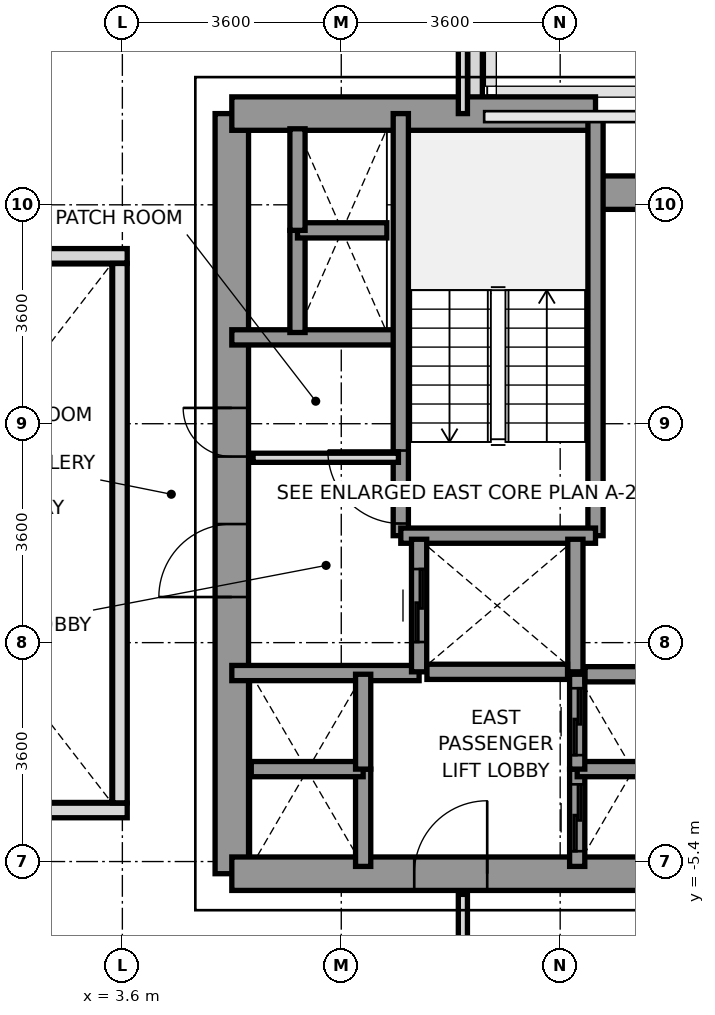
"""IFC4 building model, lengths in metres.
Left out: names, types, materials, properties, quantities, classifications, styles, units other than length and angle.
Written with IfcOpenShell. Run it as: python <this file> out.ifc"""

import sys

from ifc_helpers import new_model, si_unit, direction, frame, frame_2d, origin, place, context, subcontext, project, spatial, rectangle, extrude, source, transform, mapped, element, fill, save


model = new_model("IFC4")
c1 = context("Model", 3, precision=1e-05, world=origin(), true_north=direction((0.0, 1.0)))
c2 = subcontext(c1, "Body", "Model", "MODEL_VIEW")
j1 = project(units=[si_unit("LENGTHUNIT", "METRE"), si_unit("PLANEANGLEUNIT", "RADIAN")], contexts=[c1])
p1 = place(None, origin())
s1 = spatial("IfcSite", under=j1, at=p1, CompositionType="ELEMENT")
p2 = place(p1, origin())
s2 = spatial("IfcBuilding", under=s1, at=p2, CompositionType="ELEMENT")
p3 = place(p2, frame((0.0, 0.0, 78.2)))
s3 = spatial("IfcBuildingStorey", under=s2, at=p3, CompositionType="ELEMENT", Elevation=78.2)
p4 = place(p3, frame((9.4, 8.397, 0.0), z_axis=(0.0, 0.0, 1.0), x_axis=(0.0, -1.0, 0.0)))
e1 = element("IfcWall", 1, at=p4, inside=s3, PredefinedType="PARAPET", context=c2, shape_type="SweptSolid", body=[
    extrude(rectangle(XDim=1.444, YDim=0.24, at=frame_2d((0.722, 0.0))), origin(), (0.0, 0.0, 1.0), 1.15),
])
p5 = place(p3, frame((5.4, -5.6, 0.0), z_axis=(0.0, 0.0, 1.0), x_axis=(0.0, 1.0, 0.0)))
e2 = element("IfcWall", 2, at=p5, inside=s3, PredefinedType="SHEAR", context=c2, shape_type="SweptSolid", body=[
    extrude(rectangle(XDim=12.5, YDim=0.55, at=frame_2d((6.25, 0.0))), origin(), (0.0, 0.0, 1.0), 3.2),
])
p6 = place(p5, frame((4.55, 0.0, 0.0)))
e3 = element("IfcOpeningElement", 3, at=p6, cuts=e2, PredefinedType="OPENING", context=c2, shape_type="SweptSolid", body=[
    extrude(rectangle(XDim=1.2, YDim=2.2, at=frame_2d((0.6, 1.1))), frame((0.0, 0.285, 0.0), z_axis=(0.0, -1.0, 0.0), x_axis=(1.0, 0.0, 0.0)), (0.0, 0.0, 1.0), 0.57),
])
p7 = place(p5, frame((6.86, 0.0, 0.0)))
e4 = element("IfcOpeningElement", 4, at=p7, cuts=e2, PredefinedType="OPENING", context=c2, shape_type="SweptSolid", body=[
    extrude(rectangle(XDim=0.8, YDim=2.1, at=frame_2d((0.4, 1.05))), frame((0.0, 0.285, 0.0), z_axis=(0.0, -1.0, 0.0), x_axis=(1.0, 0.0, 0.0)), (0.0, 0.0, 1.0), 0.57),
])
p8 = place(p3, frame((5.4, 6.9, 0.0), z_axis=(0.0, 0.0, 1.0), x_axis=(1.0, 0.0, 0.0)))
e5 = element("IfcWall", 5, at=p8, inside=s3, PredefinedType="SHEAR", context=c2, shape_type="SweptSolid", body=[
    extrude(rectangle(XDim=5.981, YDim=0.55, at=frame_2d((2.991, 0.0))), origin(), (0.0, 0.0, 1.0), 3.2),
])
p9 = place(p3, frame((11.381, 5.6, 0.0), z_axis=(0.0, 0.0, 1.0), x_axis=(1.0, 0.0, 0.0)))
e6 = element("IfcWall", 6, at=p9, inside=s3, PredefinedType="SHEAR", context=c2, shape_type="SweptSolid", body=[
    extrude(rectangle(XDim=1.819, YDim=0.55, at=frame_2d((0.909, 0.0))), origin(), (0.0, 0.0, 1.0), 3.2),
])
p10 = place(p3, frame((5.4, -5.6, 0.0), z_axis=(0.0, 0.0, 1.0), x_axis=(1.0, 0.0, 0.0)))
e7 = element("IfcWall", 7, at=p10, inside=s3, PredefinedType="SHEAR", context=c2, shape_type="SweptSolid", body=[
    extrude(rectangle(XDim=7.8, YDim=0.55, at=frame_2d((3.9, 0.0))), origin(), (0.0, 0.0, 1.0), 3.2),
])
p11 = place(p10, frame((3.0, 0.0, 0.0)))
e8 = element("IfcOpeningElement", 8, at=p11, cuts=e7, PredefinedType="OPENING", context=c2, shape_type="SweptSolid", body=[
    extrude(rectangle(XDim=1.2, YDim=2.2, at=frame_2d((0.6, 1.1))), frame((0.0, 0.285, 0.0), z_axis=(0.0, -1.0, 0.0), x_axis=(1.0, 0.0, 0.0)), (0.0, 0.0, 1.0), 0.57),
])
p12 = place(p3, frame((5.4, 3.22, 0.0), z_axis=(0.0, 0.0, 1.0), x_axis=(1.0, 0.0, 0.0)))
e9 = element("IfcWall", 9, at=p12, inside=s3, PredefinedType="SOLIDWALL", context=c2, shape_type="SweptSolid", body=[
    extrude(rectangle(XDim=2.78, YDim=0.25, at=frame_2d((1.39, 0.0))), origin(), (0.0, 0.0, 1.0), 3.2),
])
p13 = place(p3, frame((5.4, -2.3, 0.0), z_axis=(0.0, 0.0, 1.0), x_axis=(1.0, 0.0, 0.0)))
e10 = element("IfcWall", 10, at=p13, inside=s3, PredefinedType="SOLIDWALL", context=c2, shape_type="SweptSolid", body=[
    extrude(rectangle(XDim=3.08, YDim=0.25, at=frame_2d((1.54, 0.0))), origin(), (0.0, 0.0, 1.0), 3.2),
])
p14 = place(p3, frame((8.179, -0.041, 0.0), z_axis=(0.0, 0.0, 1.0), x_axis=(0.0, 1.0, 0.0)))
e11 = element("IfcWall", 11, at=p14, inside=s3, PredefinedType="SOLIDWALL", context=c2, shape_type="SweptSolid", body=[
    extrude(rectangle(XDim=6.941, YDim=0.25, at=frame_2d((3.47, 0.0))), origin(), (0.0, 0.0, 1.0), 3.2),
])
p15 = place(p14, frame((0.2, 0.0, 0.0)))
e12 = element("IfcOpeningElement", 12, at=p15, cuts=e11, PredefinedType="OPENING", context=c2, shape_type="SweptSolid", body=[
    extrude(rectangle(XDim=1.2, YDim=2.2, at=frame_2d((0.6, 1.1))), frame((0.0, 0.135, 0.0), z_axis=(0.0, -1.0, 0.0), x_axis=(1.0, 0.0, 0.0)), (0.0, 0.0, 1.0), 0.27),
])
p16 = place(p3, frame((11.381, -0.041, 0.0), z_axis=(0.0, 0.0, 1.0), x_axis=(0.0, 1.0, 0.0)))
e13 = element("IfcWall", 13, at=p16, inside=s3, PredefinedType="SOLIDWALL", context=c2, shape_type="SweptSolid", body=[
    extrude(rectangle(XDim=6.941, YDim=0.25, at=frame_2d((3.47, 0.0))), origin(), (0.0, 0.0, 1.0), 3.2),
])
p17 = place(p3, frame((8.179, -0.041, 0.0), z_axis=(0.0, 0.0, 1.0), x_axis=(1.0, 0.0, 0.0)))
e14 = element("IfcWall", 14, at=p17, inside=s3, PredefinedType="SOLIDWALL", context=c2, shape_type="SweptSolid", body=[
    extrude(rectangle(XDim=3.202, YDim=0.25, at=frame_2d((1.601, 0.0))), origin(), (0.0, 0.0, 1.0), 3.2),
])
p18 = place(p3, frame((8.48, -2.28, 0.0), z_axis=(0.0, 0.0, 1.0), x_axis=(0.0, 1.0, 0.0)))
e15 = element("IfcWall", 15, at=p18, inside=s3, PredefinedType="SOLIDWALL", context=c2, shape_type="SweptSolid", body=[
    extrude(rectangle(XDim=2.18, YDim=0.25, at=frame_2d((1.09, 0.0))), origin(), (0.0, 0.0, 1.0), 3.2),
])
p19 = place(p18, frame((0.49, 0.0, 0.0)))
e16 = element("IfcOpeningElement", 16, at=p19, cuts=e15, PredefinedType="OPENING", context=c2, shape_type="SweptSolid", body=[
    extrude(rectangle(XDim=1.2, YDim=2.2, at=frame_2d((0.6, 1.1))), frame((0.0, 0.135, 0.0), z_axis=(0.0, -1.0, 0.0), x_axis=(1.0, 0.0, 0.0)), (0.0, 0.0, 1.0), 0.27),
])
p20 = place(p3, frame((11.05, -2.28, 0.0), z_axis=(0.0, 0.0, 1.0), x_axis=(0.0, 1.0, 0.0)))
e17 = element("IfcWall", 17, at=p20, inside=s3, PredefinedType="SOLIDWALL", context=c2, shape_type="SweptSolid", body=[
    extrude(rectangle(XDim=2.18, YDim=0.25, at=frame_2d((1.09, 0.0))), origin(), (0.0, 0.0, 1.0), 3.2),
])
p21 = place(p3, frame((8.609, -2.28, 0.0), z_axis=(0.0, 0.0, 1.0), x_axis=(1.0, 0.0, 0.0)))
e18 = element("IfcWall", 18, at=p21, inside=s3, PredefinedType="SOLIDWALL", context=c2, shape_type="SweptSolid", body=[
    extrude(rectangle(XDim=2.312, YDim=0.25, at=frame_2d((1.156, 0.0))), origin(), (0.0, 0.0, 1.0), 3.2),
])
p22 = place(p3, frame((11.08, -5.48, 0.0), z_axis=(0.0, 0.0, 1.0), x_axis=(0.0, 1.0, 0.0)))
e19 = element("IfcWall", 19, at=p22, inside=s3, PredefinedType="SOLIDWALL", context=c2, shape_type="SweptSolid", body=[
    extrude(rectangle(XDim=1.6, YDim=0.25, at=frame_2d((0.8, 0.0))), origin(), (0.0, 0.0, 1.0), 3.2),
])
p23 = place(p22, frame((0.25, 0.0, 0.0)))
e20 = element("IfcOpeningElement", 20, at=p23, cuts=e19, PredefinedType="OPENING", context=c2, shape_type="SweptSolid", body=[
    extrude(rectangle(XDim=1.1, YDim=2.2, at=frame_2d((0.55, 1.1))), frame((0.0, 0.135, 0.0), z_axis=(0.0, -1.0, 0.0), x_axis=(1.0, 0.0, 0.0)), (0.0, 0.0, 1.0), 0.27),
])
p24 = place(p3, frame((11.08, -3.88, 0.0), z_axis=(0.0, 0.0, 1.0), x_axis=(1.0, 0.0, 0.0)))
e21 = element("IfcWall", 21, at=p24, inside=s3, PredefinedType="SOLIDWALL", context=c2, shape_type="SweptSolid", body=[
    extrude(rectangle(XDim=1.84, YDim=0.25, at=frame_2d((0.92, 0.0))), origin(), (0.0, 0.0, 1.0), 3.2),
])
p25 = place(p3, frame((11.08, -3.88, 0.0), z_axis=(0.0, 0.0, 1.0), x_axis=(0.0, 1.0, 0.0)))
e22 = element("IfcWall", 22, at=p25, inside=s3, PredefinedType="SOLIDWALL", context=c2, shape_type="SweptSolid", body=[
    extrude(rectangle(XDim=1.56, YDim=0.25, at=frame_2d((0.78, 0.0))), origin(), (0.0, 0.0, 1.0), 3.2),
])
p26 = place(p25, frame((0.23, 0.0, 0.0)))
e23 = element("IfcOpeningElement", 23, at=p26, cuts=e22, PredefinedType="OPENING", context=c2, shape_type="SweptSolid", body=[
    extrude(rectangle(XDim=1.1, YDim=2.2, at=frame_2d((0.55, 1.1))), frame((0.0, 0.135, 0.0), z_axis=(0.0, -1.0, 0.0), x_axis=(1.0, 0.0, 0.0)), (0.0, 0.0, 1.0), 0.27),
])
p27 = place(p3, frame((11.209, -2.32, 0.0), z_axis=(0.0, 0.0, 1.0), x_axis=(1.0, 0.0, 0.0)))
e24 = element("IfcWall", 24, at=p27, inside=s3, PredefinedType="SOLIDWALL", context=c2, shape_type="SweptSolid", body=[
    extrude(rectangle(XDim=1.582, YDim=0.25, at=frame_2d((0.791, 0.0))), origin(), (0.0, 0.0, 1.0), 3.2),
])
p28 = place(p3, frame((7.56, -5.48, 0.0), z_axis=(0.0, 0.0, 1.0), x_axis=(0.0, 1.0, 0.0)))
e25 = element("IfcWall", 25, at=p28, inside=s3, PredefinedType="SOLIDWALL", context=c2, shape_type="SweptSolid", body=[
    extrude(rectangle(XDim=1.6, YDim=0.25, at=frame_2d((0.8, 0.0))), origin(), (0.0, 0.0, 1.0), 3.2),
])
p29 = place(p3, frame((5.72, -3.88, 0.0), z_axis=(0.0, 0.0, 1.0), x_axis=(1.0, 0.0, 0.0)))
e26 = element("IfcWall", 26, at=p29, inside=s3, PredefinedType="SOLIDWALL", context=c2, shape_type="SweptSolid", body=[
    extrude(rectangle(XDim=1.84, YDim=0.25, at=frame_2d((0.92, 0.0))), origin(), (0.0, 0.0, 1.0), 3.2),
])
p30 = place(p3, frame((7.56, -3.88, 0.0), z_axis=(0.0, 0.0, 1.0), x_axis=(0.0, 1.0, 0.0)))
e27 = element("IfcWall", 27, at=p30, inside=s3, PredefinedType="SOLIDWALL", context=c2, shape_type="SweptSolid", body=[
    extrude(rectangle(XDim=1.56, YDim=0.25, at=frame_2d((0.78, 0.0))), origin(), (0.0, 0.0, 1.0), 3.2),
])
p31 = place(p3, frame((6.48, 3.3, 0.0), z_axis=(0.0, 0.0, 1.0), x_axis=(0.0, 1.0, 0.0)))
e28 = element("IfcWall", 28, at=p31, inside=s3, PredefinedType="SOLIDWALL", context=c2, shape_type="SweptSolid", body=[
    extrude(rectangle(XDim=1.68, YDim=0.25, at=frame_2d((0.84, 0.0))), origin(), (0.0, 0.0, 1.0), 3.2),
])
p32 = place(p3, frame((6.48, 4.98, 0.0), z_axis=(0.0, 0.0, 1.0), x_axis=(1.0, 0.0, 0.0)))
e29 = element("IfcWall", 29, at=p32, inside=s3, PredefinedType="SOLIDWALL", context=c2, shape_type="SweptSolid", body=[
    extrude(rectangle(XDim=1.47, YDim=0.25, at=frame_2d((0.735, 0.0))), origin(), (0.0, 0.0, 1.0), 3.2),
])
p33 = place(p3, frame((6.48, 4.98, 0.0), z_axis=(0.0, 0.0, 1.0), x_axis=(0.0, 1.0, 0.0)))
e30 = element("IfcWall", 30, at=p33, inside=s3, PredefinedType="SOLIDWALL", context=c2, shape_type="SweptSolid", body=[
    extrude(rectangle(XDim=1.67, YDim=0.25, at=frame_2d((0.835, 0.0))), origin(), (0.0, 0.0, 1.0), 3.2),
])
p34 = place(p3, frame((5.75, 1.24, 0.0), z_axis=(0.0, 0.0, 1.0), x_axis=(1.0, 0.0, 0.0)))
e31 = element("IfcWall", 31, at=p34, inside=s3, PredefinedType="PARTITIONING", context=c2, shape_type="SweptSolid", body=[
    extrude(rectangle(XDim=2.39, YDim=0.15, at=frame_2d((1.195, 0.0))), origin(), (0.0, 0.0, 1.0), 2.3),
])
p35 = place(p3, frame((9.2, 6.9, 0.0), z_axis=(0.0, 0.0, 1.0), x_axis=(0.0, 1.0, 0.0)))
e32 = element("IfcWall", 32, at=p35, inside=s3, PredefinedType="PARTITIONING", context=c2, shape_type="SweptSolid", body=[
    extrude(rectangle(XDim=8.78, YDim=0.15, at=frame_2d((4.39, 0.0))), origin(), (0.0, 0.0, 1.0), 2.65),
])
p36 = place(p3, frame((9.2, -15.68, 0.0), z_axis=(0.0, 0.0, 1.0), x_axis=(0.0, 1.0, 0.0)))
e33 = element("IfcWall", 33, at=p36, inside=s3, PredefinedType="PARTITIONING", context=c2, shape_type="SweptSolid", body=[
    extrude(rectangle(XDim=9.74, YDim=0.15, at=frame_2d((4.87, 0.0))), origin(), (0.0, 0.0, 1.0), 2.65),
])
for number, where, z_axis, x_axis in (
    (34, (-3.68, -4.56, 0.0), (0.0, 0.0, 1.0), (1.0, 0.0, 0.0)),
    (35, (-3.68, 4.56, 0.0), (0.0, 0.0, 1.0), (1.0, 0.0, 0.0)),
):
    element("IfcWall", number, at=place(p3, frame(where, z_axis=z_axis, x_axis=x_axis)), inside=s3, PredefinedType="PARAPET", context=c2, shape_type="SweptSolid", body=[
        extrude(rectangle(XDim=7.36, YDim=0.24, at=frame_2d((3.68, 0.0))), origin(), (0.0, 0.0, 1.0), 1.15),
    ])
p37 = place(p3, frame((3.56, -4.435, 0.0), z_axis=(0.0, 0.0, 1.0), x_axis=(0.0, 1.0, 0.0)))
e36 = element("IfcWall", 36, at=p37, inside=s3, PredefinedType="PARAPET", context=c2, shape_type="SweptSolid", body=[
    extrude(rectangle(XDim=8.87, YDim=0.24, at=frame_2d((4.435, 0.0))), origin(), (0.0, 0.0, 1.0), 1.15),
])
m1 = source(origin(), c2, "Body", "SweptSolid", [
    extrude(rectangle(XDim=1.2, YDim=2.2, at=frame_2d((0.6, 1.1))), frame((0.0, 0.025, 0.0), z_axis=(0.0, -1.0, 0.0), x_axis=(1.0, 0.0, 0.0)), (0.0, 0.0, 1.0), 0.05),
])
p38 = place(p15, origin())
e37 = element("IfcDoor", 37, at=p38, inside=s3, OperationType="SINGLE_SWING_RIGHT", PredefinedType="DOOR", context=c2, shape_type="MappedRepresentation", body=[
    mapped(m1, transform((0.0, 0.0, 0.0), x_axis=(1.0, 0.0, 0.0), y_axis=(0.0, 1.0, 0.0), z_axis=(0.0, 0.0, 1.0), scale=1.0)),
])
fill(e12, e37)
p39 = place(p6, origin())
e38 = element("IfcDoor", 38, at=p39, inside=s3, OperationType="SINGLE_SWING_LEFT", PredefinedType="DOOR", context=c2, shape_type="MappedRepresentation", body=[
    mapped(m1, transform((0.0, 0.0, 0.0), x_axis=(1.0, 0.0, 0.0), y_axis=(0.0, 1.0, 0.0), z_axis=(0.0, 0.0, 1.0), scale=1.0)),
])
fill(e3, e38)
p40 = place(p11, origin())
e39 = element("IfcDoor", 39, at=p40, inside=s3, OperationType="SINGLE_SWING_RIGHT", PredefinedType="DOOR", context=c2, shape_type="MappedRepresentation", body=[
    mapped(m1, transform((0.0, 0.0, 0.0), x_axis=(1.0, 0.0, 0.0), y_axis=(0.0, 1.0, 0.0), z_axis=(0.0, 0.0, 1.0), scale=1.0)),
])
fill(e8, e39)
m2 = source(origin(), c2, "Body", "SweptSolid", [
    extrude(rectangle(XDim=0.8, YDim=2.1, at=frame_2d((0.4, 1.05))), frame((0.0, 0.025, 0.0), z_axis=(0.0, -1.0, 0.0), x_axis=(1.0, 0.0, 0.0)), (0.0, 0.0, 1.0), 0.05),
])
p41 = place(p7, origin())
e40 = element("IfcDoor", 40, at=p41, inside=s3, OperationType="SINGLE_SWING_RIGHT", PredefinedType="DOOR", context=c2, shape_type="MappedRepresentation", body=[
    mapped(m2, transform((0.0, 0.0, 0.0), x_axis=(1.0, 0.0, 0.0), y_axis=(0.0, 1.0, 0.0), z_axis=(0.0, 0.0, 1.0), scale=1.0)),
])
fill(e4, e40)
p42 = place(p19, origin())
e41 = element("IfcDoor", 41, at=p42, inside=s3, OperationType="SLIDING_TO_RIGHT", PredefinedType="DOOR", context=c2, shape_type="MappedRepresentation", body=[
    mapped(m1, transform((0.0, 0.0, 0.0), x_axis=(1.0, 0.0, 0.0), y_axis=(0.0, 1.0, 0.0), z_axis=(0.0, 0.0, 1.0), scale=1.0)),
])
fill(e16, e41)
m3 = source(origin(), c2, "Body", "SweptSolid", [
    extrude(rectangle(XDim=1.1, YDim=2.2, at=frame_2d((0.55, 1.1))), frame((0.0, 0.025, 0.0), z_axis=(0.0, -1.0, 0.0), x_axis=(1.0, 0.0, 0.0)), (0.0, 0.0, 1.0), 0.05),
])
p43 = place(p23, origin())
e42 = element("IfcDoor", 42, at=p43, inside=s3, OperationType="SLIDING_TO_LEFT", PredefinedType="DOOR", context=c2, shape_type="MappedRepresentation", body=[
    mapped(m3, transform((0.0, 0.0, 0.0), x_axis=(1.0, 0.0, 0.0), y_axis=(0.0, 1.0, 0.0), z_axis=(0.0, 0.0, 1.0), scale=1.0)),
])
fill(e20, e42)
p44 = place(p26, origin())
e43 = element("IfcDoor", 43, at=p44, inside=s3, OperationType="SLIDING_TO_LEFT", PredefinedType="DOOR", context=c2, shape_type="MappedRepresentation", body=[
    mapped(m3, transform((0.0, 0.0, 0.0), x_axis=(1.0, 0.0, 0.0), y_axis=(0.0, 1.0, 0.0), z_axis=(0.0, 0.0, 1.0), scale=1.0)),
])
fill(e23, e43)
save(model, sys.argv[1])
